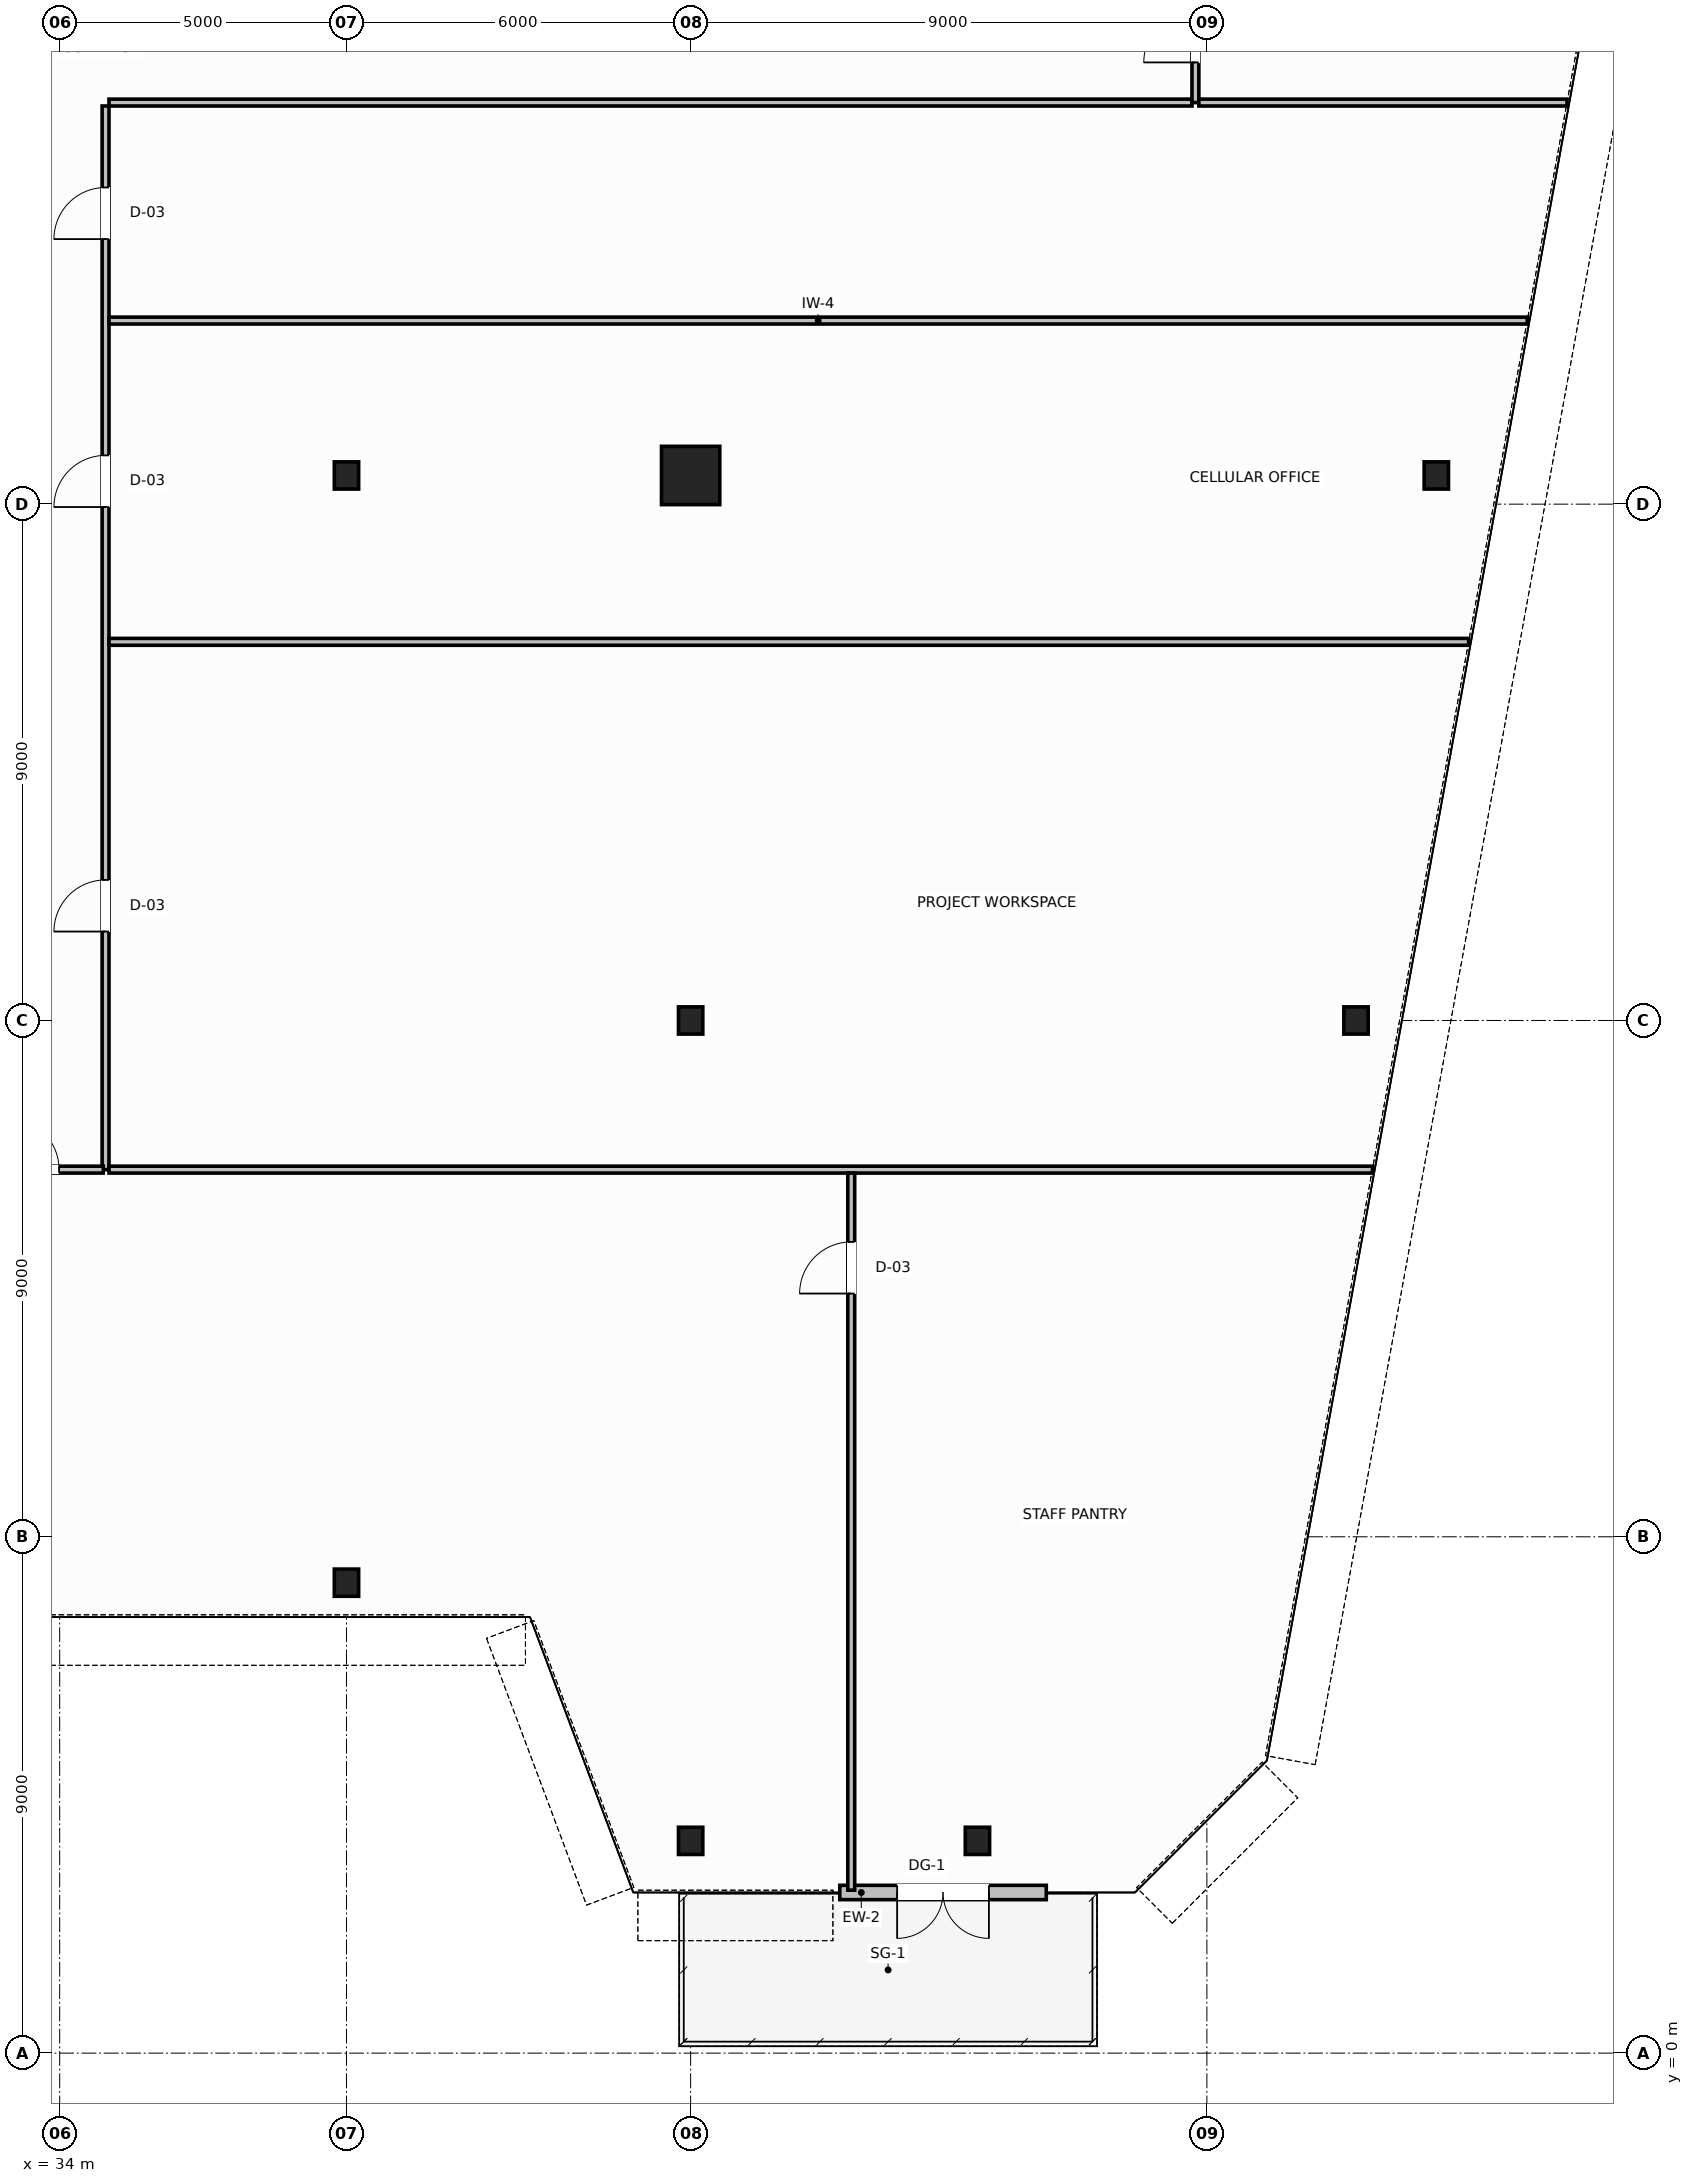
"""IFC4 building model, lengths in metres.
Left out: names, types, materials, properties, quantities, classifications, styles, units other than length and angle.
Written with IfcOpenShell. Run it as: python <this file> out.ifc"""

import sys

from ifc_helpers import new_model, si_unit, direction, frame, frame_2d, origin, origin_2d, place, context, subcontext, project, spatial, rectangle, hollow_circle, i_section, extrude, source, transform, mapped, element, fill, save


model = new_model("IFC4")
c1 = context("Model", 3, precision=1e-05, world=origin(), true_north=direction((0.0, 1.0)))
c2 = subcontext(c1, "Body", "Model", "MODEL_VIEW")
j1 = project(units=[si_unit("LENGTHUNIT", "METRE"), si_unit("PLANEANGLEUNIT", "RADIAN")], contexts=[c1])
p1 = place(None, origin())
s1 = spatial("IfcSite", under=j1, at=p1, CompositionType="ELEMENT")
p2 = place(p1, origin())
s2 = spatial("IfcBuilding", under=s1, at=p2, CompositionType="ELEMENT")
p3 = place(p2, frame((0.0, 0.0, 153.8)))
s3 = spatial("IfcBuildingStorey", under=s2, at=p3, CompositionType="ELEMENT", Elevation=153.8)
m1 = source(origin(), c2, "Body", "SweptSolid", [
    extrude(i_section(OverallWidth=0.424, OverallDepth=0.474, WebThickness=0.047, FlangeThickness=0.065, FilletRadius=0.015, at=origin_2d()), origin(), (0.0, 0.0, 1.0), 3.8),
])
for number, where, z_axis, x_axis in (
    (1, (58.0, 27.5, 0.0), (0.0, 0.0, 1.0), (1.0, 0.0, 0.0)),
    (2, (56.6, 18.0, 0.0), (0.0, 0.0, 1.0), (1.0, 0.0, 0.0)),
):
    element("IfcColumn", number, at=place(p3, frame(where, z_axis=z_axis, x_axis=x_axis)), inside=s3, PredefinedType="COLUMN", context=c2, shape_type="MappedRepresentation", body=[
        mapped(m1, transform((0.0, 0.0, 0.0), scale=1.0)),
    ])
m2 = source(origin(), c2, "Body", "SweptSolid", [
    extrude(i_section(OverallWidth=0.424, OverallDepth=0.474, WebThickness=0.047, FlangeThickness=0.065, FilletRadius=0.015, at=origin_2d()), origin(), (0.0, 0.0, 1.0), 3.8),
])
p4 = place(p3, frame((39.0, 27.5, 0.0), z_axis=(0.0, 0.0, 1.0), x_axis=(1.0, 0.0, 0.0)))
e3 = element("IfcColumn", 3, at=p4, inside=s3, PredefinedType="COLUMN", context=c2, shape_type="MappedRepresentation", body=[
    mapped(m2, transform((0.0, 0.0, 0.0), scale=1.0)),
])
m3 = source(origin(), c2, "Body", "SweptSolid", [
    extrude(hollow_circle(Radius=0.508, WallThickness=0.045, at=origin_2d()), origin(), (0.0, 0.0, 1.0), 3.8),
])
p5 = place(p3, frame((45.0, 27.5, 0.0), z_axis=(0.0, 0.0, 1.0), x_axis=(1.0, 0.0, 0.0)))
e4 = element("IfcColumn", 4, at=p5, inside=s3, PredefinedType="COLUMN", context=c2, shape_type="MappedRepresentation", body=[
    mapped(m3, transform((0.0, 0.0, 0.0), scale=1.0)),
])
p6 = place(p3, frame((45.0, 18.0, 0.0), z_axis=(0.0, 0.0, 1.0), x_axis=(1.0, 0.0, 0.0)))
e5 = element("IfcColumn", 5, at=p6, inside=s3, PredefinedType="COLUMN", context=c2, shape_type="MappedRepresentation", body=[
    mapped(m2, transform((0.0, 0.0, 0.0), scale=1.0)),
])
m4 = source(origin(), c2, "Body", "SweptSolid", [
    extrude(i_section(OverallWidth=0.424, OverallDepth=0.474, WebThickness=0.047, FlangeThickness=0.065, FilletRadius=0.015, at=origin_2d()), origin(), (0.0, 0.0, 1.0), 4.06),
])
for number, where, z_axis, x_axis in (
    (6, (39.0, 8.2, -0.26), (0.0, 0.0, 1.0), (1.0, 0.0, 0.0)),
    (7, (45.0, 3.7, -0.26), (0.0, 0.0, 1.0), (1.0, 0.0, 0.0)),
    (8, (50.0, 3.7, -0.26), (0.0, 0.0, 1.0), (1.0, 0.0, 0.0)),
):
    element("IfcColumn", number, at=place(p3, frame(where, z_axis=z_axis, x_axis=x_axis)), inside=s3, PredefinedType="COLUMN", context=c2, shape_type="MappedRepresentation", body=[
        mapped(m4, transform((0.0, 0.0, 0.0), scale=1.0)),
    ])
p7 = place(p3, frame((51.2, 2.8, 0.0), z_axis=(0.0, 0.0, 1.0), x_axis=(-1.0, 0.0, 0.0)))
e9 = element("IfcWall", 9, at=p7, inside=s3, PredefinedType="STANDARD", context=c2, shape_type="SweptSolid", body=[
    extrude(rectangle(XDim=3.6, YDim=0.25, at=frame_2d((1.8, 0.0))), origin(), (0.0, 0.0, 1.0), 3.58),
])
p8 = place(p7, frame((1.0, 0.0, 0.0)))
e10 = element("IfcOpeningElement", 10, at=p8, cuts=e9, PredefinedType="OPENING", context=c2, shape_type="SweptSolid", body=[
    extrude(rectangle(XDim=1.6, YDim=2.3, at=frame_2d((0.8, 1.15))), frame((0.0, 0.135, 0.0), z_axis=(0.0, -1.0, 0.0), x_axis=(1.0, 0.0, 0.0)), (0.0, 0.0, 1.0), 0.27),
])
p9 = place(p3, frame((34.86, 34.0, 0.0), z_axis=(0.0, 0.0, 1.0), x_axis=(1.0, 0.0, 0.0)))
e11 = element("IfcWall", 11, at=p9, inside=s3, PredefinedType="PARTITIONING", context=c2, shape_type="SweptSolid", body=[
    extrude(rectangle(XDim=18.88, YDim=0.12, at=frame_2d((9.44, 0.0))), origin(), (0.0, 0.0, 1.0), 3.58),
])
p10 = place(p3, frame((53.8, 34.0, 0.0), z_axis=(0.0, 0.0, 1.0), x_axis=(0.0, 1.0, 0.0)))
e12 = element("IfcWall", 12, at=p10, inside=s3, PredefinedType="PARTITIONING", context=c2, shape_type="SweptSolid", body=[
    extrude(rectangle(XDim=2.44, YDim=0.12, at=frame_2d((1.22, 0.0))), origin(), (0.0, 0.0, 1.0), 3.58),
])
p11 = place(p10, frame((0.7, 0.0, 0.0)))
e13 = element("IfcOpeningElement", 13, at=p11, cuts=e12, PredefinedType="OPENING", context=c2, shape_type="SweptSolid", body=[
    extrude(rectangle(XDim=0.9, YDim=2.15, at=frame_2d((0.45, 1.075))), frame((0.0, 0.07, 0.0), z_axis=(0.0, -1.0, 0.0), x_axis=(1.0, 0.0, 0.0)), (0.0, 0.0, 1.0), 0.14),
])
p12 = place(p3, frame((34.8, 15.4, 0.0), z_axis=(0.0, 0.0, 1.0), x_axis=(0.0, 1.0, 0.0)))
e14 = element("IfcWall", 14, at=p12, inside=s3, PredefinedType="PARTITIONING", context=c2, shape_type="SweptSolid", body=[
    extrude(rectangle(XDim=18.54, YDim=0.12, at=frame_2d((9.27, 0.0))), origin(), (0.0, 0.0, 1.0), 3.58),
])
p13 = place(p12, frame((4.15, 0.0, 0.0)))
e15 = element("IfcOpeningElement", 15, at=p13, cuts=e14, PredefinedType="OPENING", context=c2, shape_type="SweptSolid", body=[
    extrude(rectangle(XDim=0.9, YDim=2.15, at=frame_2d((0.45, 1.075))), frame((0.0, 0.07, 0.0), z_axis=(0.0, -1.0, 0.0), x_axis=(1.0, 0.0, 0.0)), (0.0, 0.0, 1.0), 0.14),
])
p14 = place(p12, frame((11.55, 0.0, 0.0)))
e16 = element("IfcOpeningElement", 16, at=p14, cuts=e14, PredefinedType="OPENING", context=c2, shape_type="SweptSolid", body=[
    extrude(rectangle(XDim=0.9, YDim=2.15, at=frame_2d((0.45, 1.075))), frame((0.0, 0.07, 0.0), z_axis=(0.0, -1.0, 0.0), x_axis=(1.0, 0.0, 0.0)), (0.0, 0.0, 1.0), 0.14),
])
p15 = place(p12, frame((16.22, 0.0, 0.0)))
e17 = element("IfcOpeningElement", 17, at=p15, cuts=e14, PredefinedType="OPENING", context=c2, shape_type="SweptSolid", body=[
    extrude(rectangle(XDim=0.9, YDim=2.15, at=frame_2d((0.45, 1.075))), frame((0.0, 0.07, 0.0), z_axis=(0.0, -1.0, 0.0), x_axis=(1.0, 0.0, 0.0)), (0.0, 0.0, 1.0), 0.14),
])
p16 = place(p3, frame((32.44, 15.4, 0.0), z_axis=(0.0, 0.0, 1.0), x_axis=(1.0, 0.0, 0.0)))
e18 = element("IfcWall", 18, at=p16, inside=s3, PredefinedType="PARTITIONING", context=c2, shape_type="SweptSolid", body=[
    extrude(rectangle(XDim=2.32, YDim=0.12, at=frame_2d((1.16, 0.0))), origin(), (0.0, 0.0, 1.0), 3.58),
])
p17 = place(p16, frame((0.65, 0.0, 0.0)))
e19 = element("IfcOpeningElement", 19, at=p17, cuts=e18, PredefinedType="OPENING", context=c2, shape_type="SweptSolid", body=[
    extrude(rectangle(XDim=0.9, YDim=2.15, at=frame_2d((0.45, 1.075))), frame((0.0, 0.07, 0.0), z_axis=(0.0, -1.0, 0.0), x_axis=(1.0, 0.0, 0.0)), (0.0, 0.0, 1.0), 0.14),
])
p18 = place(p3, frame((53.86, 34.0, 0.0), z_axis=(0.0, 0.0, 1.0), x_axis=(1.0, 0.0, 0.0)))
e20 = element("IfcWall", 20, at=p18, inside=s3, PredefinedType="PARTITIONING", context=c2, shape_type="SweptSolid", body=[
    extrude(rectangle(XDim=6.418, YDim=0.12, at=frame_2d((3.209, 0.0))), origin(), (0.0, 0.0, 1.0), 3.58),
])
p19 = place(p3, frame((34.86, 24.6, 0.0), z_axis=(0.0, 0.0, 1.0), x_axis=(1.0, 0.0, 0.0)))
e21 = element("IfcWall", 21, at=p19, inside=s3, PredefinedType="PARTITIONING", context=c2, shape_type="SweptSolid", body=[
    extrude(rectangle(XDim=23.704, YDim=0.12, at=frame_2d((11.852, 0.0))), origin(), (0.0, 0.0, 1.0), 3.58),
])
p20 = place(p3, frame((34.86, 30.2, 0.0), z_axis=(0.0, 0.0, 1.0), x_axis=(1.0, 0.0, 0.0)))
e22 = element("IfcWall", 22, at=p20, inside=s3, PredefinedType="PARTITIONING", context=c2, shape_type="SweptSolid", body=[
    extrude(rectangle(XDim=24.725, YDim=0.12, at=frame_2d((12.363, 0.0))), origin(), (0.0, 0.0, 1.0), 3.58),
])
p21 = place(p3, frame((34.86, 15.4, 0.0), z_axis=(0.0, 0.0, 1.0), x_axis=(1.0, 0.0, 0.0)))
e23 = element("IfcWall", 23, at=p21, inside=s3, PredefinedType="PARTITIONING", context=c2, shape_type="SweptSolid", body=[
    extrude(rectangle(XDim=22.026, YDim=0.12, at=frame_2d((11.013, 0.0))), origin(), (0.0, 0.0, 1.0), 3.58),
])
p22 = place(p3, frame((47.8, 2.84, 0.0), z_axis=(0.0, 0.0, 1.0), x_axis=(0.0, 1.0, 0.0)))
e24 = element("IfcWall", 24, at=p22, inside=s3, PredefinedType="PARTITIONING", context=c2, shape_type="SweptSolid", body=[
    extrude(rectangle(XDim=12.5, YDim=0.12, at=frame_2d((6.25, 0.0))), origin(), (0.0, 0.0, 1.0), 3.58),
])
p23 = place(p22, frame((10.4, 0.0, 0.0)))
e25 = element("IfcOpeningElement", 25, at=p23, cuts=e24, PredefinedType="OPENING", context=c2, shape_type="SweptSolid", body=[
    extrude(rectangle(XDim=0.9, YDim=2.15, at=frame_2d((0.45, 1.075))), frame((0.0, 0.07, 0.0), z_axis=(0.0, -1.0, 0.0), x_axis=(1.0, 0.0, 0.0)), (0.0, 0.0, 1.0), 0.14),
])
m5 = source(origin(), c2, "Body", "SweptSolid", [
    extrude(rectangle(XDim=1.6, YDim=2.3, at=frame_2d((0.8, 1.15))), frame((0.0, 0.025, 0.0), z_axis=(0.0, -1.0, 0.0), x_axis=(1.0, 0.0, 0.0)), (0.0, 0.0, 1.0), 0.05),
])
p24 = place(p8, origin())
e26 = element("IfcDoor", 26, at=p24, inside=s3, OperationType="DOUBLE_DOOR_SINGLE_SWING", PredefinedType="DOOR", context=c2, shape_type="MappedRepresentation", body=[
    mapped(m5, transform((0.0, 0.0, 0.0), scale=1.0)),
])
fill(e10, e26)
m6 = source(origin(), c2, "Body", "SweptSolid", [
    extrude(rectangle(XDim=0.9, YDim=2.15, at=frame_2d((0.45, 1.075))), frame((0.0, 0.025, 0.0), z_axis=(0.0, -1.0, 0.0), x_axis=(1.0, 0.0, 0.0)), (0.0, 0.0, 1.0), 0.05),
])
p25 = place(p11, origin())
e27 = element("IfcDoor", 27, at=p25, inside=s3, OperationType="SINGLE_SWING_RIGHT", PredefinedType="DOOR", context=c2, shape_type="MappedRepresentation", body=[
    mapped(m6, transform((0.0, 0.0, 0.0), scale=1.0)),
])
fill(e13, e27)
p26 = place(p13, origin())
e28 = element("IfcDoor", 28, at=p26, inside=s3, OperationType="SINGLE_SWING_RIGHT", PredefinedType="DOOR", context=c2, shape_type="MappedRepresentation", body=[
    mapped(m6, transform((0.0, 0.0, 0.0), scale=1.0)),
])
fill(e15, e28)
p27 = place(p14, origin())
e29 = element("IfcDoor", 29, at=p27, inside=s3, OperationType="SINGLE_SWING_LEFT", PredefinedType="DOOR", context=c2, shape_type="MappedRepresentation", body=[
    mapped(m6, transform((0.0, 0.0, 0.0), scale=1.0)),
])
fill(e16, e29)
p28 = place(p15, origin())
e30 = element("IfcDoor", 30, at=p28, inside=s3, OperationType="SINGLE_SWING_RIGHT", PredefinedType="DOOR", context=c2, shape_type="MappedRepresentation", body=[
    mapped(m6, transform((0.0, 0.0, 0.0), scale=1.0)),
])
fill(e17, e30)
p29 = place(p17, origin())
e31 = element("IfcDoor", 31, at=p29, inside=s3, OperationType="SINGLE_SWING_LEFT", PredefinedType="DOOR", context=c2, shape_type="MappedRepresentation", body=[
    mapped(m6, transform((0.0, 0.0, 0.0), scale=1.0)),
])
fill(e19, e31)
p30 = place(p23, origin())
e32 = element("IfcDoor", 32, at=p30, inside=s3, OperationType="SINGLE_SWING_LEFT", PredefinedType="DOOR", context=c2, shape_type="MappedRepresentation", body=[
    mapped(m6, transform((0.0, 0.0, 0.0), scale=1.0)),
])
fill(e25, e32)
save(model, sys.argv[1])
